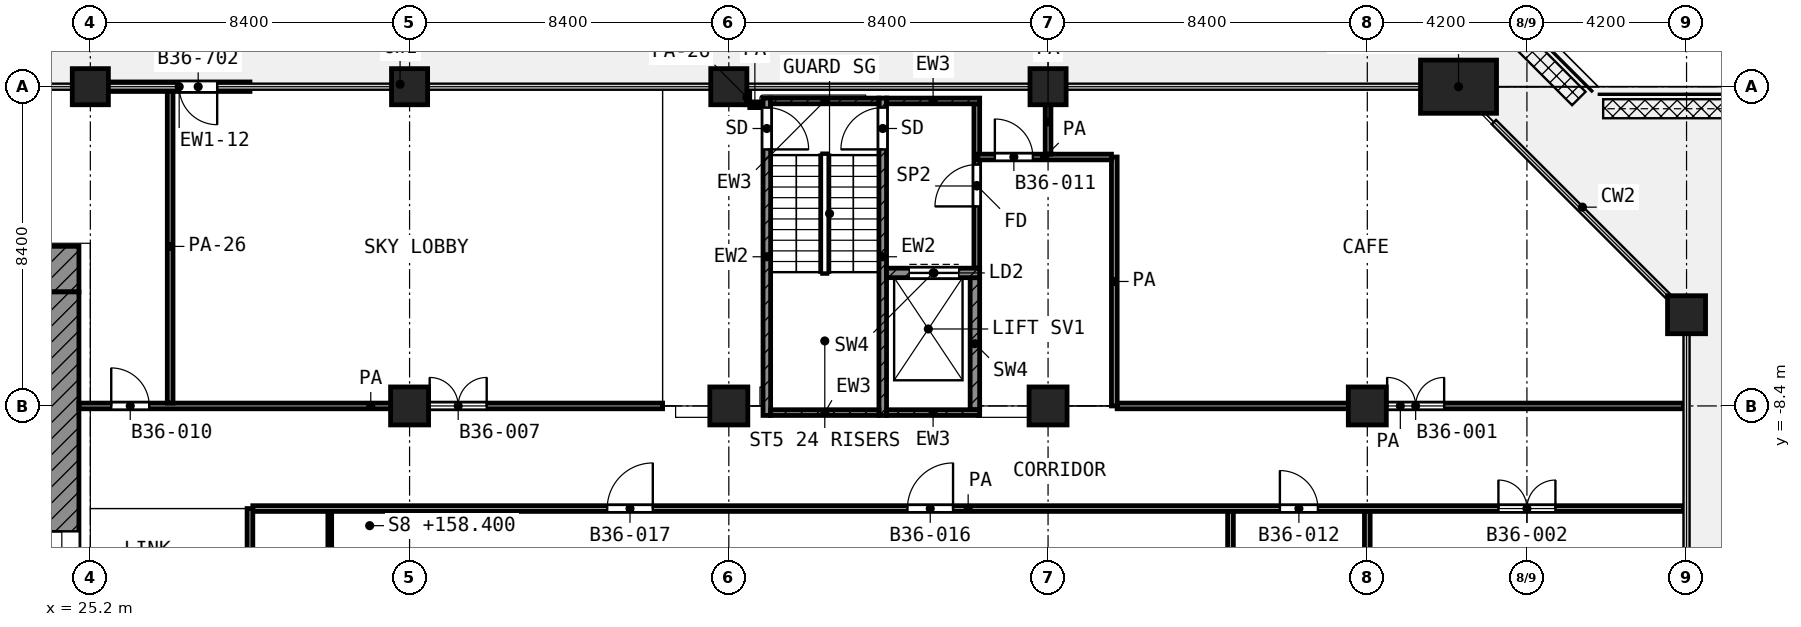
"""IFC4 building model, lengths in metres.
Left out: names, types, materials, properties, quantities, classifications, styles, units other than length and angle.
Written with IfcOpenShell. Run it as: python <this file> out.ifc"""

import sys

from ifc_helpers import new_model, si_unit, direction, frame, frame_2d, origin, origin_2d, place, context, subcontext, project, spatial, rectangle, extrude, element, fill, save


model = new_model("IFC4")
c1 = context("Model", 3, precision=1e-05, world=origin(), true_north=direction((0.0, 1.0)))
c2 = subcontext(c1, "Body", "Model", "MODEL_VIEW")
j1 = project(units=[si_unit("LENGTHUNIT", "METRE"), si_unit("PLANEANGLEUNIT", "RADIAN")], contexts=[c1])
p1 = place(None, origin())
s1 = spatial("IfcSite", under=j1, at=p1, CompositionType="ELEMENT")
p2 = place(p1, origin())
s2 = spatial("IfcBuilding", under=s1, at=p2, CompositionType="ELEMENT")
p3 = place(p2, frame((0.0, 0.0, 158.4)))
s3 = spatial("IfcBuildingStorey", under=s2, at=p3, CompositionType="ELEMENT", Elevation=158.4)
for number, where, z_axis, x_axis in (
    (1, (25.2, 0.0, 0.0), (0.0, 0.0, 1.0), (1.0, 0.0, 0.0)),
    (2, (33.6, 0.0, 0.0), (0.0, 0.0, 1.0), (1.0, 0.0, 0.0)),
    (3, (42.0, 0.0, 0.0), (0.0, 0.0, 1.0), (1.0, 0.0, 0.0)),
    (4, (50.4, 0.0, 0.0), (0.0, 0.0, 1.0), (1.0, 0.0, 0.0)),
):
    element("IfcColumn", number, at=place(p3, frame(where, z_axis=z_axis, x_axis=x_axis)), inside=s3, PredefinedType="COLUMN", context=c2, shape_type="SweptSolid", body=[
        extrude(rectangle(XDim=0.95, YDim=0.95, at=origin_2d()), origin(), (0.0, 0.0, 1.0), 4.2),
    ])
p4 = place(p3, frame((61.2, 0.0, 0.0), z_axis=(0.0, 0.0, 1.0), x_axis=(1.0, 0.0, 0.0)))
e5 = element("IfcColumn", 5, at=p4, inside=s3, PredefinedType="COLUMN", context=c2, shape_type="SweptSolid", body=[
    extrude(rectangle(XDim=2.0, YDim=1.4, at=origin_2d()), origin(), (0.0, 0.0, 1.0), 4.2),
])
for number, where, z_axis, x_axis in (
    (6, (67.2, -6.0, 0.0), (0.0, 0.0, 1.0), (1.0, 0.0, 0.0)),
    (7, (33.6, -8.4, 0.0), (0.0, 0.0, 1.0), (1.0, 0.0, 0.0)),
    (8, (42.0, -8.4, 0.0), (0.0, 0.0, 1.0), (1.0, 0.0, 0.0)),
    (9, (50.4, -8.4, 0.0), (0.0, 0.0, 1.0), (1.0, 0.0, 0.0)),
    (10, (58.8, -8.4, 0.0), (0.0, 0.0, 1.0), (1.0, 0.0, 0.0)),
):
    element("IfcColumn", number, at=place(p3, frame(where, z_axis=z_axis, x_axis=x_axis)), inside=s3, PredefinedType="COLUMN", context=c2, shape_type="SweptSolid", body=[
        extrude(rectangle(XDim=1.0, YDim=1.0, at=origin_2d()), origin(), (0.0, 0.0, 1.0), 4.2),
    ])
p5 = place(p3, frame((29.4, 0.0, 0.0), z_axis=(0.0, 0.0, 1.0), x_axis=(-1.0, 0.0, 0.0)))
e11 = element("IfcWall", 11, at=p5, inside=s3, PredefinedType="SOLIDWALL", context=c2, shape_type="SweptSolid", body=[
    extrude(rectangle(XDim=3.725, YDim=0.25, at=frame_2d((1.862, 0.0))), origin(), (0.0, 0.0, 1.0), 2.58),
])
p6 = place(p5, frame((0.863, 0.0, 0.0)))
e12 = element("IfcOpeningElement", 12, at=p6, cuts=e11, PredefinedType="OPENING", context=c2, shape_type="SweptSolid", body=[
    extrude(rectangle(XDim=1.0, YDim=2.1, at=frame_2d((0.5, 1.05))), frame((0.0, 0.135, 0.0), z_axis=(0.0, -1.0, 0.0), x_axis=(1.0, 0.0, 0.0)), (0.0, 0.0, 1.0), 0.27),
])
p7 = place(p3, frame((4.2, -4.8, 0.0), z_axis=(0.0, 0.0, 1.0), x_axis=(1.0, 0.0, 0.0)))
e13 = element("IfcWall", 13, at=p7, inside=s3, PredefinedType="SHEAR", context=c2, shape_type="SweptSolid", body=[
    extrude(rectangle(XDim=20.7, YDim=1.2, at=frame_2d((10.35, 0.0))), origin(), (0.0, 0.0, 1.0), 3.6),
])
p8 = place(p7, frame((1.95, 0.0, 0.0)))
e14 = element("IfcOpeningElement", 14, at=p8, cuts=e13, PredefinedType="OPENING", context=c2, shape_type="SweptSolid", body=[
    extrude(rectangle(XDim=1.1, YDim=2.1, at=frame_2d((0.55, 1.05))), frame((0.0, 0.61, 0.0), z_axis=(0.0, -1.0, 0.0), x_axis=(1.0, 0.0, 0.0)), (0.0, 0.0, 1.0), 1.22),
])
p9 = place(p7, frame((17.95, 0.0, 0.0)))
e15 = element("IfcOpeningElement", 15, at=p9, cuts=e13, PredefinedType="OPENING", context=c2, shape_type="SweptSolid", body=[
    extrude(rectangle(XDim=1.1, YDim=2.1, at=frame_2d((0.55, 1.05))), frame((0.0, 0.61, 0.0), z_axis=(0.0, -1.0, 0.0), x_axis=(1.0, 0.0, 0.0)), (0.0, 0.0, 1.0), 1.22),
])
p10 = place(p3, frame((24.45, -24.0, 0.0), z_axis=(0.0, 0.0, 1.0), x_axis=(0.0, 1.0, 0.0)))
e16 = element("IfcWall", 16, at=p10, inside=s3, PredefinedType="SHEAR", context=c2, shape_type="SweptSolid", body=[
    extrude(rectangle(XDim=18.6, YDim=0.9, at=frame_2d((9.3, 0.0))), origin(), (0.0, 0.0, 1.0), 3.6),
])
p11 = place(p10, frame((10.5, 0.0, 0.0)))
e17 = element("IfcOpeningElement", 17, at=p11, cuts=e16, PredefinedType="OPENING", context=c2, shape_type="SweptSolid", body=[
    extrude(rectangle(XDim=1.8, YDim=2.1, at=frame_2d((0.9, 1.05))), frame((0.0, 0.46, 0.0), z_axis=(0.0, -1.0, 0.0), x_axis=(1.0, 0.0, 0.0)), (0.0, 0.0, 1.0), 0.92),
])
p12 = place(p3, frame((43.0, -8.65, 0.0), z_axis=(0.0, 0.0, 1.0), x_axis=(0.0, 1.0, 0.0)))
e18 = element("IfcWall", 18, at=p12, inside=s3, PredefinedType="SHEAR", context=c2, shape_type="SweptSolid", body=[
    extrude(rectangle(XDim=8.35, YDim=0.2, at=frame_2d((4.175, 0.0))), origin(), (0.0, 0.0, 1.0), 3.6),
])
p13 = place(p12, frame((7.0, 0.0, 0.0)))
e19 = element("IfcOpeningElement", 19, at=p13, cuts=e18, PredefinedType="OPENING", context=c2, shape_type="SweptSolid", body=[
    extrude(rectangle(XDim=1.1, YDim=2.1, at=frame_2d((0.55, 1.05))), frame((0.0, 0.11, 0.0), z_axis=(0.0, -1.0, 0.0), x_axis=(1.0, 0.0, 0.0)), (0.0, 0.0, 1.0), 0.22),
])
p14 = place(p3, frame((46.05, -8.65, 0.0), z_axis=(0.0, 0.0, 1.0), x_axis=(0.0, 1.0, 0.0)))
e20 = element("IfcWall", 20, at=p14, inside=s3, PredefinedType="SHEAR", context=c2, shape_type="SweptSolid", body=[
    extrude(rectangle(XDim=8.35, YDim=0.2, at=frame_2d((4.175, 0.0))), origin(), (0.0, 0.0, 1.0), 3.6),
])
p15 = place(p14, frame((7.0, 0.0, 0.0)))
e21 = element("IfcOpeningElement", 21, at=p15, cuts=e20, PredefinedType="OPENING", context=c2, shape_type="SweptSolid", body=[
    extrude(rectangle(XDim=1.1, YDim=2.1, at=frame_2d((0.55, 1.05))), frame((0.0, 0.11, 0.0), z_axis=(0.0, -1.0, 0.0), x_axis=(1.0, 0.0, 0.0)), (0.0, 0.0, 1.0), 0.22),
])
p16 = place(p3, frame((43.1, -0.375, 0.0), z_axis=(0.0, 0.0, 1.0), x_axis=(1.0, 0.0, 0.0)))
e22 = element("IfcWall", 22, at=p16, inside=s3, PredefinedType="SHEAR", context=c2, shape_type="SweptSolid", body=[
    extrude(rectangle(XDim=2.85, YDim=0.15, at=frame_2d((1.425, 0.0))), origin(), (0.0, 0.0, 1.0), 3.6),
])
p17 = place(p3, frame((46.15, -0.375, 0.0), z_axis=(0.0, 0.0, 1.0), x_axis=(1.0, 0.0, 0.0)))
e23 = element("IfcWall", 23, at=p17, inside=s3, PredefinedType="SHEAR", context=c2, shape_type="SweptSolid", body=[
    extrude(rectangle(XDim=2.45, YDim=0.15, at=frame_2d((1.225, 0.0))), origin(), (0.0, 0.0, 1.0), 3.6),
])
p18 = place(p3, frame((43.1, -8.575, 0.0), z_axis=(0.0, 0.0, 1.0), x_axis=(1.0, 0.0, 0.0)))
e24 = element("IfcWall", 24, at=p18, inside=s3, PredefinedType="SHEAR", context=c2, shape_type="SweptSolid", body=[
    extrude(rectangle(XDim=2.85, YDim=0.15, at=frame_2d((1.425, 0.0))), origin(), (0.0, 0.0, 1.0), 3.6),
])
p19 = place(p3, frame((46.15, -8.575, 0.0), z_axis=(0.0, 0.0, 1.0), x_axis=(1.0, 0.0, 0.0)))
e25 = element("IfcWall", 25, at=p19, inside=s3, PredefinedType="SHEAR", context=c2, shape_type="SweptSolid", body=[
    extrude(rectangle(XDim=2.45, YDim=0.15, at=frame_2d((1.225, 0.0))), origin(), (0.0, 0.0, 1.0), 3.6),
])
p20 = place(p3, frame((46.15, -4.9, 0.0), z_axis=(0.0, 0.0, 1.0), x_axis=(1.0, 0.0, 0.0)))
e26 = element("IfcWall", 26, at=p20, inside=s3, PredefinedType="SHEAR", context=c2, shape_type="SweptSolid", body=[
    extrude(rectangle(XDim=2.45, YDim=0.25, at=frame_2d((1.225, 0.0))), origin(), (0.0, 0.0, 1.0), 3.6),
])
p21 = place(p20, frame((0.6, 0.0, 0.0)))
e27 = element("IfcOpeningElement", 27, at=p21, cuts=e26, PredefinedType="OPENING", context=c2, shape_type="SweptSolid", body=[
    extrude(rectangle(XDim=1.3, YDim=2.1, at=frame_2d((0.65, 1.05))), frame((0.0, 0.135, 0.0), z_axis=(0.0, -1.0, 0.0), x_axis=(1.0, 0.0, 0.0)), (0.0, 0.0, 1.0), 0.27),
])
p22 = place(p3, frame((48.475, -8.5, 0.0), z_axis=(0.0, 0.0, 1.0), x_axis=(0.0, 1.0, 0.0)))
e28 = element("IfcWall", 28, at=p22, inside=s3, PredefinedType="SHEAR", context=c2, shape_type="SweptSolid", body=[
    extrude(rectangle(XDim=3.475, YDim=0.25, at=frame_2d((1.738, 0.0))), origin(), (0.0, 0.0, 1.0), 3.6),
])
p23 = place(p3, frame((48.525, -4.775, 0.0), z_axis=(0.0, 0.0, 1.0), x_axis=(0.0, 1.0, 0.0)))
e29 = element("IfcWall", 29, at=p23, inside=s3, PredefinedType="PARTITIONING", context=c2, shape_type="SweptSolid", body=[
    extrude(rectangle(XDim=4.325, YDim=0.15, at=frame_2d((2.163, 0.0))), origin(), (0.0, 0.0, 1.0), 3.6),
])
p24 = place(p23, frame((1.625, 0.0, 0.0)))
e30 = element("IfcOpeningElement", 30, at=p24, cuts=e29, PredefinedType="OPENING", context=c2, shape_type="SweptSolid", body=[
    extrude(rectangle(XDim=1.1, YDim=2.1, at=frame_2d((0.55, 1.05))), frame((0.0, 0.085, 0.0), z_axis=(0.0, -1.0, 0.0), x_axis=(1.0, 0.0, 0.0)), (0.0, 0.0, 1.0), 0.17),
])
p25 = place(p3, frame((31.5, -13.8, 0.0), z_axis=(0.0, 0.0, 1.0), x_axis=(0.0, 1.0, 0.0)))
e31 = element("IfcWall", 31, at=p25, inside=s3, PredefinedType="PARTITIONING", context=c2, shape_type="SweptSolid", body=[
    extrude(rectangle(XDim=2.625, YDim=0.1, at=frame_2d((1.312, 0.0))), origin(), (0.0, 0.0, 1.0), 3.6),
])
p26 = place(p3, frame((29.475, -11.1, 0.0), z_axis=(0.0, 0.0, 1.0), x_axis=(1.0, 0.0, 0.0)))
e32 = element("IfcWall", 32, at=p26, inside=s3, PredefinedType="PARTITIONING", context=c2, shape_type="SweptSolid", body=[
    extrude(rectangle(XDim=37.645, YDim=0.15, at=frame_2d((18.823, 0.0))), origin(), (0.0, 0.0, 1.0), 3.6),
])
p27 = place(p26, frame((17.225, 0.0, 0.0)))
e33 = element("IfcOpeningElement", 33, at=p27, cuts=e32, PredefinedType="OPENING", context=c2, shape_type="SweptSolid", body=[
    extrude(rectangle(XDim=1.2, YDim=2.1, at=frame_2d((0.6, 1.05))), frame((0.0, 0.085, 0.0), z_axis=(0.0, -1.0, 0.0), x_axis=(1.0, 0.0, 0.0)), (0.0, 0.0, 1.0), 0.17),
])
p28 = place(p26, frame((9.325, 0.0, 0.0)))
e34 = element("IfcOpeningElement", 34, at=p28, cuts=e32, PredefinedType="OPENING", context=c2, shape_type="SweptSolid", body=[
    extrude(rectangle(XDim=1.2, YDim=2.1, at=frame_2d((0.6, 1.05))), frame((0.0, 0.085, 0.0), z_axis=(0.0, -1.0, 0.0), x_axis=(1.0, 0.0, 0.0)), (0.0, 0.0, 1.0), 0.17),
])
p29 = place(p26, frame((27.025, 0.0, 0.0)))
e35 = element("IfcOpeningElement", 35, at=p29, cuts=e32, PredefinedType="OPENING", context=c2, shape_type="SweptSolid", body=[
    extrude(rectangle(XDim=1.0, YDim=2.1, at=frame_2d((0.5, 1.05))), frame((0.0, 0.085, 0.0), z_axis=(0.0, -1.0, 0.0), x_axis=(1.0, 0.0, 0.0)), (0.0, 0.0, 1.0), 0.17),
])
p30 = place(p26, frame((32.775, 0.0, 0.0)))
e36 = element("IfcOpeningElement", 36, at=p30, cuts=e32, PredefinedType="OPENING", context=c2, shape_type="SweptSolid", body=[
    extrude(rectangle(XDim=1.5, YDim=2.1, at=frame_2d((0.75, 1.05))), frame((0.0, 0.085, 0.0), z_axis=(0.0, -1.0, 0.0), x_axis=(1.0, 0.0, 0.0)), (0.0, 0.0, 1.0), 0.17),
])
p31 = place(p3, frame((24.9, -8.4, 0.0), z_axis=(0.0, 0.0, 1.0), x_axis=(1.0, 0.0, 0.0)))
e37 = element("IfcWall", 37, at=p31, inside=s3, PredefinedType="PARTITIONING", context=c2, shape_type="SweptSolid", body=[
    extrude(rectangle(XDim=15.357, YDim=0.15, at=frame_2d((7.679, 0.0))), origin(), (0.0, 0.0, 1.0), 3.6),
])
p32 = place(p31, frame((0.85, 0.0, 0.0)))
e38 = element("IfcOpeningElement", 38, at=p32, cuts=e37, PredefinedType="OPENING", context=c2, shape_type="SweptSolid", body=[
    extrude(rectangle(XDim=1.0, YDim=2.1, at=frame_2d((0.5, 1.05))), frame((0.0, 0.085, 0.0), z_axis=(0.0, -1.0, 0.0), x_axis=(1.0, 0.0, 0.0)), (0.0, 0.0, 1.0), 0.17),
])
p33 = place(p31, frame((9.229, 0.0, 0.0)))
e39 = element("IfcOpeningElement", 39, at=p33, cuts=e37, PredefinedType="OPENING", context=c2, shape_type="SweptSolid", body=[
    extrude(rectangle(XDim=1.5, YDim=2.1, at=frame_2d((0.75, 1.05))), frame((0.0, 0.085, 0.0), z_axis=(0.0, -1.0, 0.0), x_axis=(1.0, 0.0, 0.0)), (0.0, 0.0, 1.0), 0.17),
])
p34 = place(p3, frame((52.218, -8.4, 0.0), z_axis=(0.0, 0.0, 1.0), x_axis=(1.0, 0.0, 0.0)))
e40 = element("IfcWall", 40, at=p34, inside=s3, PredefinedType="PARTITIONING", context=c2, shape_type="SweptSolid", body=[
    extrude(rectangle(XDim=14.902, YDim=0.15, at=frame_2d((7.451, 0.0))), origin(), (0.0, 0.0, 1.0), 3.6),
])
p35 = place(p34, frame((7.104, 0.0, 0.0)))
e41 = element("IfcOpeningElement", 41, at=p35, cuts=e40, PredefinedType="OPENING", context=c2, shape_type="SweptSolid", body=[
    extrude(rectangle(XDim=1.5, YDim=2.1, at=frame_2d((0.75, 1.05))), frame((0.0, 0.085, 0.0), z_axis=(0.0, -1.0, 0.0), x_axis=(1.0, 0.0, 0.0)), (0.0, 0.0, 1.0), 0.17),
])
p36 = place(p3, frame((48.55, -1.85, 0.0), z_axis=(0.0, 0.0, 1.0), x_axis=(1.0, 0.0, 0.0)))
e42 = element("IfcWall", 42, at=p36, inside=s3, PredefinedType="PARTITIONING", context=c2, shape_type="SweptSolid", body=[
    extrude(rectangle(XDim=3.518, YDim=0.15, at=frame_2d((1.759, 0.0))), origin(), (0.0, 0.0, 1.0), 3.6),
])
p37 = place(p36, frame((0.45, 0.0, 0.0)))
e43 = element("IfcOpeningElement", 43, at=p37, cuts=e42, PredefinedType="OPENING", context=c2, shape_type="SweptSolid", body=[
    extrude(rectangle(XDim=1.0, YDim=2.1, at=frame_2d((0.5, 1.05))), frame((0.0, 0.085, 0.0), z_axis=(0.0, -1.0, 0.0), x_axis=(1.0, 0.0, 0.0)), (0.0, 0.0, 1.0), 0.17),
])
p38 = place(p3, frame((42.551, -0.475, 0.0), z_axis=(0.0, 0.0, 1.0), x_axis=(1.0, 0.0, 0.0)))
e44 = element("IfcWall", 44, at=p38, inside=s3, PredefinedType="PARTITIONING", context=c2, shape_type="SweptSolid", body=[
    extrude(rectangle(XDim=0.269, YDim=0.15, at=frame_2d((0.135, 0.0))), origin(), (0.0, 0.0, 1.0), 3.6),
])
p39 = place(p3, frame((27.3, -8.325, 0.0), z_axis=(0.0, 0.0, 1.0), x_axis=(0.0, 1.0, 0.0)))
e45 = element("IfcWall", 45, at=p39, inside=s3, PredefinedType="PARTITIONING", context=c2, shape_type="SweptSolid", body=[
    extrude(rectangle(XDim=8.245, YDim=0.15, at=frame_2d((4.123, 0.0))), origin(), (0.0, 0.0, 1.0), 2.7),
])
p40 = place(p3, frame((29.4, -14.1, 0.0), z_axis=(0.0, 0.0, 1.0), x_axis=(0.0, 1.0, 0.0)))
e46 = element("IfcWall", 46, at=p40, inside=s3, PredefinedType="PARTITIONING", context=c2, shape_type="SweptSolid", body=[
    extrude(rectangle(XDim=3.0, YDim=0.15, at=frame_2d((1.5, 0.0))), origin(), (0.0, 0.0, 1.0), 3.6),
])
p41 = place(p3, frame((42.475, -0.473, 0.0), z_axis=(0.0, 0.0, 1.0), x_axis=(0.0, 1.0, 0.0)))
e47 = element("IfcWall", 47, at=p41, inside=s3, PredefinedType="PARTITIONING", context=c2, shape_type="SweptSolid", body=[
    extrude(rectangle(XDim=0.393, YDim=0.15, at=frame_2d((0.196, 0.0))), origin(), (0.0, 0.0, 1.0), 2.7),
])
p42 = place(p3, frame((50.4, -1.775, 0.0), z_axis=(0.0, 0.0, 1.0), x_axis=(0.0, 1.0, 0.0)))
e48 = element("IfcWall", 48, at=p42, inside=s3, PredefinedType="PARTITIONING", context=c2, shape_type="SweptSolid", body=[
    extrude(rectangle(XDim=1.695, YDim=0.15, at=frame_2d((0.847, 0.0))), origin(), (0.0, 0.0, 1.0), 3.6),
])
p43 = place(p3, frame((52.143, -8.4, 0.0), z_axis=(0.0, 0.0, 1.0), x_axis=(0.0, 1.0, 0.0)))
e49 = element("IfcWall", 49, at=p43, inside=s3, PredefinedType="PARTITIONING", context=c2, shape_type="SweptSolid", body=[
    extrude(rectangle(XDim=6.55, YDim=0.15, at=frame_2d((3.275, 0.0))), origin(), (0.0, 0.0, 1.0), 3.6),
])
for number, where, z_axis, x_axis in (
    (50, (55.2, -16.72, 0.0), (0.0, 0.0, 1.0), (0.0, 1.0, 0.0)),
    (51, (58.8, -16.72, 0.0), (0.0, 0.0, 1.0), (0.0, 1.0, 0.0)),
):
    element("IfcWall", number, at=place(p3, frame(where, z_axis=z_axis, x_axis=x_axis)), inside=s3, PredefinedType="PARTITIONING", context=c2, shape_type="SweptSolid", body=[
        extrude(rectangle(XDim=5.545, YDim=0.15, at=frame_2d((2.772, 0.0))), origin(), (0.0, 0.0, 1.0), 3.6),
    ])
p44 = place(p6, origin())
e52 = element("IfcDoor", 52, at=p44, inside=s3, OperationType="SINGLE_SWING_LEFT", PredefinedType="DOOR", context=c2, shape_type="SweptSolid", body=[
    extrude(rectangle(XDim=1.0, YDim=2.1, at=frame_2d((0.5, 1.05))), frame((0.0, 0.025, 0.0), z_axis=(0.0, -1.0, 0.0), x_axis=(1.0, 0.0, 0.0)), (0.0, 0.0, 1.0), 0.05),
])
fill(e12, e52)
p45 = place(p11, origin())
e53 = element("IfcDoor", 53, at=p45, inside=s3, OperationType="DOUBLE_DOOR_SINGLE_SWING", PredefinedType="DOOR", context=c2, shape_type="SweptSolid", body=[
    extrude(rectangle(XDim=1.8, YDim=2.1, at=frame_2d((0.9, 1.05))), frame((0.0, 0.025, 0.0), z_axis=(0.0, -1.0, 0.0), x_axis=(1.0, 0.0, 0.0)), (0.0, 0.0, 1.0), 0.05),
])
fill(e17, e53)
p46 = place(p13, frame((1.1, 0.0, 0.0), z_axis=(0.0, 0.0, 1.0), x_axis=(-1.0, 0.0, 0.0)))
e54 = element("IfcDoor", 54, at=p46, inside=s3, OperationType="SINGLE_SWING_LEFT", PredefinedType="DOOR", context=c2, shape_type="SweptSolid", body=[
    extrude(rectangle(XDim=1.1, YDim=2.1, at=frame_2d((0.55, 1.05))), frame((0.0, 0.025, 0.0), z_axis=(0.0, -1.0, 0.0), x_axis=(1.0, 0.0, 0.0)), (0.0, 0.0, 1.0), 0.05),
])
fill(e19, e54)
p47 = place(p15, origin())
e55 = element("IfcDoor", 55, at=p47, inside=s3, OperationType="SINGLE_SWING_LEFT", PredefinedType="DOOR", context=c2, shape_type="SweptSolid", body=[
    extrude(rectangle(XDim=1.1, YDim=2.1, at=frame_2d((0.55, 1.05))), frame((0.0, 0.025, 0.0), z_axis=(0.0, -1.0, 0.0), x_axis=(1.0, 0.0, 0.0)), (0.0, 0.0, 1.0), 0.05),
])
fill(e21, e55)
p48 = place(p21, origin())
e56 = element("IfcDoor", 56, at=p48, inside=s3, OperationType="DOUBLE_DOOR_SLIDING", PredefinedType="DOOR", context=c2, shape_type="SweptSolid", body=[
    extrude(rectangle(XDim=1.3, YDim=2.1, at=frame_2d((0.65, 1.05))), frame((0.0, 0.025, 0.0), z_axis=(0.0, -1.0, 0.0), x_axis=(1.0, 0.0, 0.0)), (0.0, 0.0, 1.0), 0.05),
])
fill(e27, e56)
p49 = place(p24, origin())
e57 = element("IfcDoor", 57, at=p49, inside=s3, OperationType="SINGLE_SWING_LEFT", PredefinedType="DOOR", context=c2, shape_type="SweptSolid", body=[
    extrude(rectangle(XDim=1.1, YDim=2.1, at=frame_2d((0.55, 1.05))), frame((0.0, 0.025, 0.0), z_axis=(0.0, -1.0, 0.0), x_axis=(1.0, 0.0, 0.0)), (0.0, 0.0, 1.0), 0.05),
])
fill(e30, e57)
p50 = place(p37, origin())
e58 = element("IfcDoor", 58, at=p50, inside=s3, OperationType="SINGLE_SWING_LEFT", PredefinedType="DOOR", context=c2, shape_type="SweptSolid", body=[
    extrude(rectangle(XDim=1.0, YDim=2.1, at=frame_2d((0.5, 1.05))), frame((0.0, 0.025, 0.0), z_axis=(0.0, -1.0, 0.0), x_axis=(1.0, 0.0, 0.0)), (0.0, 0.0, 1.0), 0.05),
])
fill(e43, e58)
p51 = place(p35, origin())
e59 = element("IfcDoor", 59, at=p51, inside=s3, OperationType="DOUBLE_DOOR_SINGLE_SWING", PredefinedType="DOOR", context=c2, shape_type="SweptSolid", body=[
    extrude(rectangle(XDim=1.5, YDim=2.1, at=frame_2d((0.75, 1.05))), frame((0.0, 0.025, 0.0), z_axis=(0.0, -1.0, 0.0), x_axis=(1.0, 0.0, 0.0)), (0.0, 0.0, 1.0), 0.05),
])
fill(e41, e59)
p52 = place(p27, origin())
e60 = element("IfcDoor", 60, at=p52, inside=s3, OperationType="SINGLE_SWING_RIGHT", PredefinedType="DOOR", context=c2, shape_type="SweptSolid", body=[
    extrude(rectangle(XDim=1.2, YDim=2.1, at=frame_2d((0.6, 1.05))), frame((0.0, 0.025, 0.0), z_axis=(0.0, -1.0, 0.0), x_axis=(1.0, 0.0, 0.0)), (0.0, 0.0, 1.0), 0.05),
])
fill(e33, e60)
p53 = place(p28, origin())
e61 = element("IfcDoor", 61, at=p53, inside=s3, OperationType="SINGLE_SWING_RIGHT", PredefinedType="DOOR", context=c2, shape_type="SweptSolid", body=[
    extrude(rectangle(XDim=1.2, YDim=2.1, at=frame_2d((0.6, 1.05))), frame((0.0, 0.025, 0.0), z_axis=(0.0, -1.0, 0.0), x_axis=(1.0, 0.0, 0.0)), (0.0, 0.0, 1.0), 0.05),
])
fill(e34, e61)
p54 = place(p29, origin())
e62 = element("IfcDoor", 62, at=p54, inside=s3, OperationType="SINGLE_SWING_LEFT", PredefinedType="DOOR", context=c2, shape_type="SweptSolid", body=[
    extrude(rectangle(XDim=1.0, YDim=2.1, at=frame_2d((0.5, 1.05))), frame((0.0, 0.025, 0.0), z_axis=(0.0, -1.0, 0.0), x_axis=(1.0, 0.0, 0.0)), (0.0, 0.0, 1.0), 0.05),
])
fill(e35, e62)
p55 = place(p30, origin())
e63 = element("IfcDoor", 63, at=p55, inside=s3, OperationType="DOUBLE_DOOR_SINGLE_SWING", PredefinedType="DOOR", context=c2, shape_type="SweptSolid", body=[
    extrude(rectangle(XDim=1.5, YDim=2.1, at=frame_2d((0.75, 1.05))), frame((0.0, 0.025, 0.0), z_axis=(0.0, -1.0, 0.0), x_axis=(1.0, 0.0, 0.0)), (0.0, 0.0, 1.0), 0.05),
])
fill(e36, e63)
p56 = place(p32, origin())
e64 = element("IfcDoor", 64, at=p56, inside=s3, OperationType="SINGLE_SWING_LEFT", PredefinedType="DOOR", context=c2, shape_type="SweptSolid", body=[
    extrude(rectangle(XDim=1.0, YDim=2.1, at=frame_2d((0.5, 1.05))), frame((0.0, 0.025, 0.0), z_axis=(0.0, -1.0, 0.0), x_axis=(1.0, 0.0, 0.0)), (0.0, 0.0, 1.0), 0.05),
])
fill(e38, e64)
p57 = place(p33, origin())
e65 = element("IfcDoor", 65, at=p57, inside=s3, OperationType="DOUBLE_DOOR_SINGLE_SWING", PredefinedType="DOOR", context=c2, shape_type="SweptSolid", body=[
    extrude(rectangle(XDim=1.5, YDim=2.1, at=frame_2d((0.75, 1.05))), frame((0.0, 0.025, 0.0), z_axis=(0.0, -1.0, 0.0), x_axis=(1.0, 0.0, 0.0)), (0.0, 0.0, 1.0), 0.05),
])
fill(e39, e65)
save(model, sys.argv[1])
